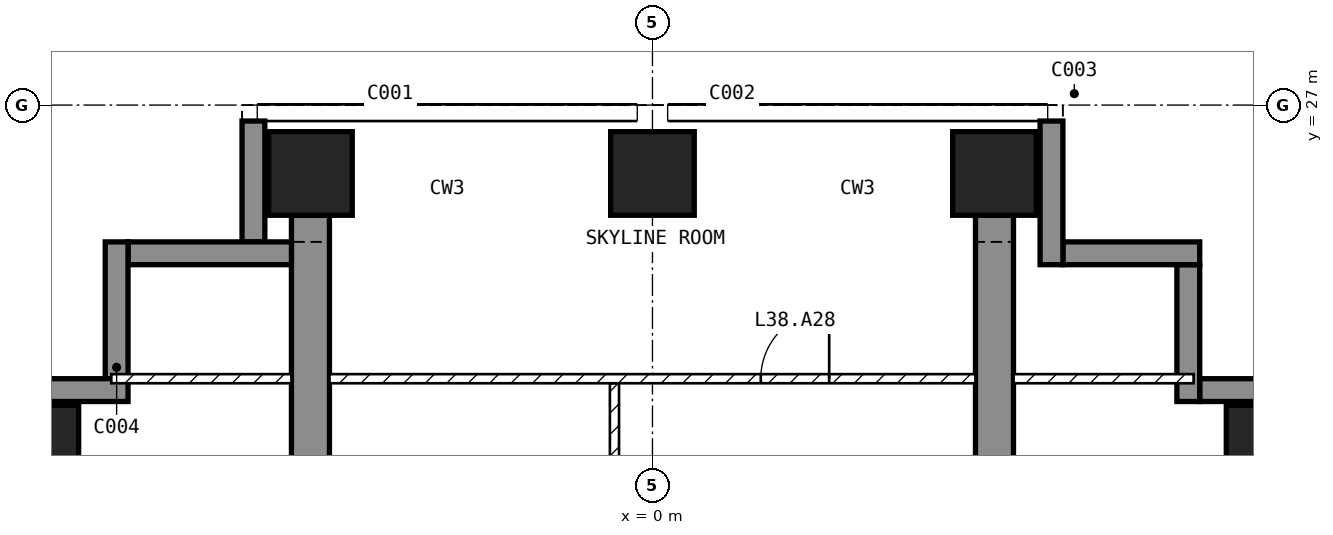
"""IFC4 building model, lengths in metres.
Left out: names, types, materials, properties, quantities, classifications, styles, units other than length and angle.
Written with IfcOpenShell. Run it as: python <this file> out.ifc"""

import sys

from ifc_helpers import new_model, si_unit, direction, frame, frame_2d, origin, origin_2d, place, context, subcontext, project, spatial, polyline, rectangle, outline, extrude, element, fill, save


model = new_model("IFC4")
c1 = context("Model", 3, precision=1e-05, world=origin(), true_north=direction((0.0, 1.0)))
c2 = subcontext(c1, "Body", "Model", "MODEL_VIEW")
j1 = project(units=[si_unit("LENGTHUNIT", "METRE"), si_unit("PLANEANGLEUNIT", "RADIAN")], contexts=[c1])
p1 = place(None, origin())
s1 = spatial("IfcSite", under=j1, at=p1, CompositionType="ELEMENT")
p2 = place(p1, origin())
s2 = spatial("IfcBuilding", under=s1, at=p2, CompositionType="ELEMENT")
p3 = place(p2, frame((0.0, 0.0, 154.9)))
s3 = spatial("IfcBuildingStorey", under=s2, at=p3, CompositionType="ELEMENT", Elevation=154.9)
for number, where, z_axis, x_axis in (
    (1, (-8.1, 22.5, -0.3), (0.0, 0.0, 1.0), (1.0, 0.0, 0.0)),
    (2, (-4.5, 26.1, -0.3), (0.0, 0.0, 1.0), (1.0, 0.0, 0.0)),
    (3, (0.0, 26.1, -0.3), (0.0, 0.0, 1.0), (1.0, 0.0, 0.0)),
    (4, (4.5, 26.1, -0.3), (0.0, 0.0, 1.0), (1.0, 0.0, 0.0)),
    (5, (8.1, 22.5, -0.3), (0.0, 0.0, 1.0), (1.0, 0.0, 0.0)),
):
    element("IfcColumn", number, at=place(p3, frame(where, z_axis=z_axis, x_axis=x_axis)), inside=s3, PredefinedType="COLUMN", context=c2, shape_type="SweptSolid", body=[
        extrude(rectangle(XDim=1.1, YDim=1.1, at=origin_2d()), origin(), (0.0, 0.0, 1.0), 7.05),
    ])
for number, where, z_axis, x_axis in (
    (6, (-4.75, 9.0, -0.3), (1.0, 0.0, 0.0), (0.0, 1.0, 0.0)),
    (7, (4.25, 9.0, -0.3), (1.0, 0.0, 0.0), (0.0, 1.0, 0.0)),
):
    element("IfcWall", number, at=place(p3, frame(where, z_axis=z_axis, x_axis=x_axis)), inside=s3, PredefinedType="SHEAR", context=c2, shape_type="SweptSolid", body=[
        extrude(outline(polyline([(0.0, 0.0), (2.1, 0.0), (2.1, 2.7), (4.5, 2.7), (4.5, 0.0), (9.9, 0.0), (9.9, 2.7), (12.3, 2.7), (12.3, 0.0), (16.55, 0.0), (16.55, 7.05), (0.0, 7.05), (0.0, 0.0)])), origin(), (0.0, 0.0, 1.0), 0.5),
    ])
p4 = place(p3, frame((8.79, 23.25, 0.0), z_axis=(0.0, 0.0, 1.0), x_axis=(-1.0, 0.0, 0.0)))
e8 = element("IfcWall", 8, at=p4, inside=s3, PredefinedType="SOLIDWALL", context=c2, shape_type="SweptSolid", body=[
    extrude(rectangle(XDim=1.59, YDim=0.3, at=frame_2d((0.795, 0.0))), origin(), (0.0, 0.0, 1.0), 6.75),
])
p5 = place(p3, frame((7.05, 23.1, 0.0), z_axis=(0.0, 0.0, 1.0), x_axis=(0.0, 1.0, 0.0)))
e9 = element("IfcWall", 9, at=p5, inside=s3, PredefinedType="SOLIDWALL", context=c2, shape_type="SweptSolid", body=[
    extrude(rectangle(XDim=1.8, YDim=0.3, at=frame_2d((0.9, 0.0))), origin(), (0.0, 0.0, 1.0), 6.75),
])
p6 = place(p3, frame((7.2, 25.05, 0.0), z_axis=(0.0, 0.0, 1.0), x_axis=(-1.0, 0.0, 0.0)))
e10 = element("IfcWall", 10, at=p6, inside=s3, PredefinedType="SOLIDWALL", context=c2, shape_type="SweptSolid", body=[
    extrude(rectangle(XDim=1.8, YDim=0.3, at=frame_2d((0.9, 0.0))), origin(), (0.0, 0.0, 1.0), 6.75),
])
p7 = place(p3, frame((5.25, 24.9, 0.0), z_axis=(0.0, 0.0, 1.0), x_axis=(0.0, 1.0, 0.0)))
e11 = element("IfcWall", 11, at=p7, inside=s3, PredefinedType="SOLIDWALL", context=c2, shape_type="SweptSolid", body=[
    extrude(rectangle(XDim=1.89, YDim=0.3, at=frame_2d((0.945, 0.0))), origin(), (0.0, 0.0, 1.0), 6.75),
])
p8 = place(p3, frame((-5.25, 26.79, 0.0), z_axis=(0.0, 0.0, 1.0), x_axis=(0.0, -1.0, 0.0)))
e12 = element("IfcWall", 12, at=p8, inside=s3, PredefinedType="SOLIDWALL", context=c2, shape_type="SweptSolid", body=[
    extrude(rectangle(XDim=1.59, YDim=0.3, at=frame_2d((0.795, 0.0))), origin(), (0.0, 0.0, 1.0), 6.75),
])
p9 = place(p3, frame((-4.75, 25.05, 0.0), z_axis=(0.0, 0.0, 1.0), x_axis=(-1.0, 0.0, 0.0)))
e13 = element("IfcWall", 13, at=p9, inside=s3, PredefinedType="SOLIDWALL", context=c2, shape_type="SweptSolid", body=[
    extrude(rectangle(XDim=2.15, YDim=0.3, at=frame_2d((1.075, 0.0))), origin(), (0.0, 0.0, 1.0), 6.75),
])
p10 = place(p3, frame((-7.05, 25.2, 0.0), z_axis=(0.0, 0.0, 1.0), x_axis=(0.0, -1.0, 0.0)))
e14 = element("IfcWall", 14, at=p10, inside=s3, PredefinedType="SOLIDWALL", context=c2, shape_type="SweptSolid", body=[
    extrude(rectangle(XDim=1.8, YDim=0.3, at=frame_2d((0.9, 0.0))), origin(), (0.0, 0.0, 1.0), 6.75),
])
p11 = place(p3, frame((-6.9, 23.25, 0.0), z_axis=(0.0, 0.0, 1.0), x_axis=(-1.0, 0.0, 0.0)))
e15 = element("IfcWall", 15, at=p11, inside=s3, PredefinedType="SOLIDWALL", context=c2, shape_type="SweptSolid", body=[
    extrude(rectangle(XDim=1.89, YDim=0.3, at=frame_2d((0.945, 0.0))), origin(), (0.0, 0.0, 1.0), 6.75),
])
p12 = place(p3, frame((-0.5, 18.96, 0.0), z_axis=(0.0, 0.0, 1.0), x_axis=(0.0, 1.0, 0.0)))
e16 = element("IfcWall", 16, at=p12, inside=s3, PredefinedType="PARTITIONING", context=c2, shape_type="SweptSolid", body=[
    extrude(rectangle(XDim=4.38, YDim=0.12, at=frame_2d((2.19, 0.0))), origin(), (0.0, 0.0, 1.0), 6.75),
])
p13 = place(p12, frame((1.74, 0.0, 0.0)))
e17 = element("IfcOpeningElement", 17, at=p13, cuts=e16, PredefinedType="OPENING", context=c2, shape_type="SweptSolid", body=[
    extrude(rectangle(XDim=0.9, YDim=2.1, at=frame_2d((0.45, 1.05))), frame((0.0, 0.07, 0.0), z_axis=(0.0, -1.0, 0.0), x_axis=(1.0, 0.0, 0.0)), (0.0, 0.0, 1.0), 0.14),
])
p14 = place(p3, frame((-4.25, 23.4, 0.0), z_axis=(0.0, 0.0, 1.0), x_axis=(1.0, 0.0, 0.0)))
e18 = element("IfcWall", 18, at=p14, inside=s3, PredefinedType="PARTITIONING", context=c2, shape_type="SweptSolid", body=[
    extrude(rectangle(XDim=8.5, YDim=0.12, at=frame_2d((4.25, 0.0))), origin(), (0.0, 0.0, 1.0), 6.75),
])
p15 = place(p14, frame((5.675, 0.0, 0.0)))
e19 = element("IfcOpeningElement", 19, at=p15, cuts=e18, PredefinedType="OPENING", context=c2, shape_type="SweptSolid", body=[
    extrude(rectangle(XDim=0.9, YDim=2.1, at=frame_2d((0.45, 1.05))), frame((0.0, 0.07, 0.0), z_axis=(0.0, -1.0, 0.0), x_axis=(1.0, 0.0, 0.0)), (0.0, 0.0, 1.0), 0.14),
])
for number, where, z_axis, x_axis in (
    (20, (4.75, 23.4, 0.0), (0.0, 0.0, 1.0), (1.0, 0.0, 0.0)),
    (21, (-7.12, 23.4, 0.0), (0.0, 0.0, 1.0), (1.0, 0.0, 0.0)),
):
    element("IfcWall", number, at=place(p3, frame(where, z_axis=z_axis, x_axis=x_axis)), inside=s3, PredefinedType="PARTITIONING", context=c2, shape_type="SweptSolid", body=[
        extrude(rectangle(XDim=2.37, YDim=0.12, at=frame_2d((1.185, 0.0))), origin(), (0.0, 0.0, 1.0), 6.75),
    ])
p16 = place(p15, origin())
e22 = element("IfcDoor", 22, at=p16, inside=s3, OperationType="SINGLE_SWING_RIGHT", PredefinedType="DOOR", context=c2, shape_type="SweptSolid", body=[
    extrude(rectangle(XDim=0.9, YDim=2.1, at=frame_2d((0.45, 1.05))), frame((0.0, 0.025, 0.0), z_axis=(0.0, -1.0, 0.0), x_axis=(1.0, 0.0, 0.0)), (0.0, 0.0, 1.0), 0.05),
])
fill(e19, e22)
save(model, sys.argv[1])
